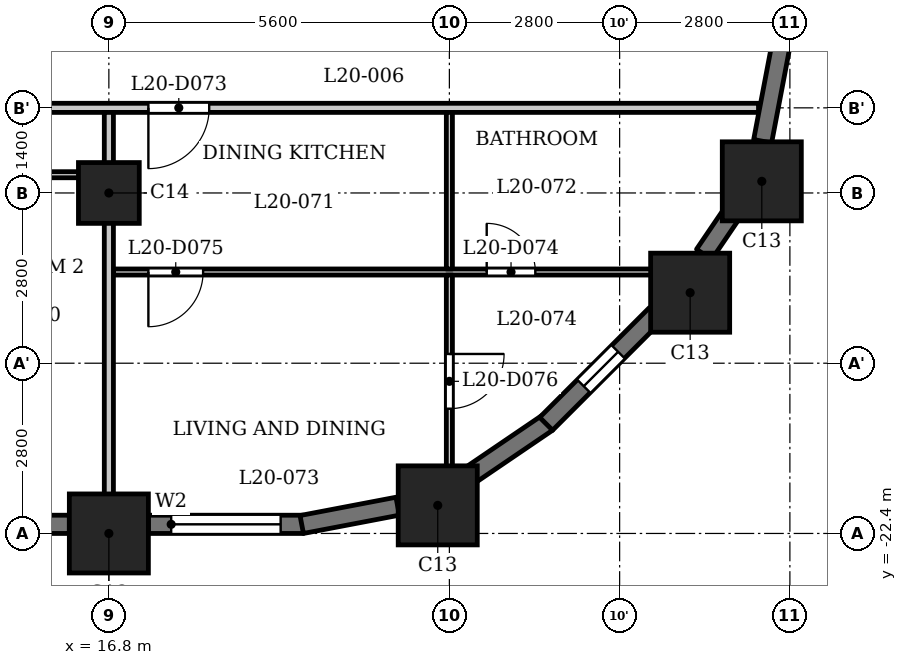
"""IFC4 building model, lengths in metres.
Left out: names, types, materials, properties, quantities, classifications, styles, units other than length and angle.
Written with IfcOpenShell. Run it as: python <this file> out.ifc"""

import sys

from ifc_helpers import new_model, si_unit, direction, frame, frame_2d, origin, origin_2d, place, context, subcontext, project, spatial, rectangle, extrude, element, fill, save


model = new_model("IFC4")
c1 = context("Model", 3, precision=1e-05, world=origin(), true_north=direction((0.0, 1.0)))
c2 = subcontext(c1, "Body", "Model", "MODEL_VIEW")
j1 = project(units=[si_unit("LENGTHUNIT", "METRE"), si_unit("PLANEANGLEUNIT", "RADIAN")], contexts=[c1])
p1 = place(None, origin())
s1 = spatial("IfcSite", under=j1, at=p1, CompositionType="ELEMENT")
p2 = place(p1, origin())
s2 = spatial("IfcBuilding", under=s1, at=p2, CompositionType="ELEMENT")
p3 = place(p2, frame((0.0, 0.0, 83.3)))
s3 = spatial("IfcBuildingStorey", under=s2, at=p3, CompositionType="ELEMENT", Elevation=83.3)
for number, where, z_axis, x_axis in (
    (1, (16.8, -22.4, 0.0), (0.0, 0.0, 1.0), (1.0, 0.0, 0.0)),
    (2, (22.209, -21.938, 0.0), (0.0, 0.0, 1.0), (1.0, 0.0, 0.0)),
    (3, (26.36, -18.44, 0.0), (0.0, 0.0, 1.0), (1.0, 0.0, 0.0)),
    (4, (27.538, -16.609, 0.0), (0.0, 0.0, 1.0), (1.0, 0.0, 0.0)),
):
    element("IfcColumn", number, at=place(p3, frame(where, z_axis=z_axis, x_axis=x_axis)), inside=s3, PredefinedType="COLUMN", context=c2, shape_type="SweptSolid", body=[
        extrude(rectangle(XDim=1.3, YDim=1.3, at=origin_2d()), origin(), (0.0, 0.0, 1.0), 3.5),
    ])
p4 = place(p3, frame((16.8, -16.8, 0.0), z_axis=(0.0, 0.0, 1.0), x_axis=(1.0, 0.0, 0.0)))
e5 = element("IfcColumn", 5, at=p4, inside=s3, PredefinedType="COLUMN", context=c2, shape_type="SweptSolid", body=[
    extrude(rectangle(XDim=1.0, YDim=1.0, at=origin_2d()), origin(), (0.0, 0.0, 1.0), 3.5),
])
p5 = place(p3, frame((11.85, -22.25, 0.0), z_axis=(0.0, 0.0, 1.0), x_axis=(1.0, 0.0, 0.0)))
e6 = element("IfcWall", 6, at=p5, inside=s3, PredefinedType="SOLIDWALL", context=c2, shape_type="SweptSolid", body=[
    extrude(rectangle(XDim=4.3, YDim=0.3, at=frame_2d((2.15, 0.0))), origin(), (0.0, 0.0, 1.0), 2.4),
])
p6 = place(p5, frame((0.337, 0.0, 0.6)))
e7 = element("IfcOpeningElement", 7, at=p6, cuts=e6, PredefinedType="OPENING", context=c2, shape_type="SweptSolid", body=[
    extrude(rectangle(XDim=1.2, YDim=1.55, at=frame_2d((0.6, 0.775))), frame((0.0, 0.16, 0.0), z_axis=(0.0, -1.0, 0.0), x_axis=(1.0, 0.0, 0.0)), (0.0, 0.0, 1.0), 0.32),
])
p7 = place(p5, frame((2.562, 0.0, 0.6)))
e8 = element("IfcOpeningElement", 8, at=p7, cuts=e6, PredefinedType="OPENING", context=c2, shape_type="SweptSolid", body=[
    extrude(rectangle(XDim=1.2, YDim=1.55, at=frame_2d((0.6, 0.775))), frame((0.0, 0.16, 0.0), z_axis=(0.0, -1.0, 0.0), x_axis=(1.0, 0.0, 0.0)), (0.0, 0.0, 1.0), 0.32),
])
p8 = place(p3, frame((17.45, -22.25, 0.0), z_axis=(0.0, 0.0, 1.0), x_axis=(1.0, 0.0, 0.0)))
e9 = element("IfcWall", 9, at=p8, inside=s3, PredefinedType="SOLIDWALL", context=c2, shape_type="SweptSolid", body=[
    extrude(rectangle(XDim=2.55, YDim=0.3, at=frame_2d((1.275, 0.0))), origin(), (0.0, 0.0, 1.0), 2.4),
])
p9 = place(p8, frame((0.375, 0.0, 0.9)))
e10 = element("IfcOpeningElement", 10, at=p9, cuts=e9, PredefinedType="OPENING", context=c2, shape_type="SweptSolid", body=[
    extrude(rectangle(XDim=1.8, YDim=1.25, at=frame_2d((0.9, 0.625))), frame((0.0, 0.16, 0.0), z_axis=(0.0, -1.0, 0.0), x_axis=(1.0, 0.0, 0.0)), (0.0, 0.0, 1.0), 0.32),
])
for number, where, z_axis, x_axis in (
    (11, (19.972, -22.253, 0.0), (0.0, 0.0, 1.0), (0.982, 0.187, 0.0)),
    (12, (22.684, -21.482, 0.0), (0.0, 0.0, 1.0), (0.827, 0.562, 0.0)),
):
    element("IfcWall", number, at=place(p3, frame(where, z_axis=z_axis, x_axis=x_axis)), inside=s3, PredefinedType="SOLIDWALL", context=c2, shape_type="SweptSolid", body=[
        extrude(rectangle(XDim=1.606, YDim=0.3, at=frame_2d((0.803, 0.0))), origin(), (0.0, 0.0, 1.0), 2.4),
    ])
p10 = place(p3, frame((23.991, -20.597, 0.0), z_axis=(0.0, 0.0, 1.0), x_axis=(0.707106781187, 0.707106781187, 0.0)))
e13 = element("IfcWall", 13, at=p10, inside=s3, PredefinedType="SOLIDWALL", context=c2, shape_type="SweptSolid", body=[
    extrude(rectangle(XDim=2.55, YDim=0.3, at=frame_2d((1.275, 0.0))), origin(), (0.0, 0.0, 1.0), 2.4),
])
p11 = place(p10, frame((0.875, 0.0, 0.6)))
e14 = element("IfcOpeningElement", 14, at=p11, cuts=e13, PredefinedType="OPENING", context=c2, shape_type="SweptSolid", body=[
    extrude(rectangle(XDim=0.8, YDim=1.55, at=frame_2d((0.4, 0.775))), frame((0.0, 0.16, 0.0), z_axis=(0.0, -1.0, 0.0), x_axis=(1.0, 0.0, 0.0)), (0.0, 0.0, 1.0), 0.32),
])
p12 = place(p3, frame((26.589, -17.81, 0.0), z_axis=(0.0, 0.0, 1.0), x_axis=(0.562066330934, 0.827092159091, 0.0)))
e15 = element("IfcWall", 15, at=p12, inside=s3, PredefinedType="SOLIDWALL", context=c2, shape_type="SweptSolid", body=[
    extrude(rectangle(XDim=0.877, YDim=0.3, at=frame_2d((0.438, 0.0))), origin(), (0.0, 0.0, 1.0), 3.2),
])
p13 = place(p3, frame((27.552, -15.949, 0.0), z_axis=(0.0, 0.0, 1.0), x_axis=(0.187279751651, 0.982306619453, 0.0)))
e16 = element("IfcWall", 16, at=p13, inside=s3, PredefinedType="SOLIDWALL", context=c2, shape_type="SweptSolid", body=[
    extrude(rectangle(XDim=1.606, YDim=0.3, at=frame_2d((0.803, 0.0))), origin(), (0.0, 0.0, 1.0), 2.4),
])
p14 = place(p3, frame((16.875, -18.1, 0.0), z_axis=(0.0, 0.0, 1.0), x_axis=(1.0, 0.0, 0.0)))
e17 = element("IfcWall", 17, at=p14, inside=s3, PredefinedType="PARTITIONING", context=c2, shape_type="SweptSolid", body=[
    extrude(rectangle(XDim=9.565, YDim=0.1, at=frame_2d((4.782, 0.0))), origin(), (0.0, 0.0, 1.0), 3.2),
])
p15 = place(p14, frame((6.139, 0.0, 0.0)))
e18 = element("IfcOpeningElement", 18, at=p15, cuts=e17, PredefinedType="OPENING", context=c2, shape_type="SweptSolid", body=[
    extrude(rectangle(XDim=0.8, YDim=2.1, at=frame_2d((0.4, 1.05))), frame((0.0, 0.06, 0.0), z_axis=(0.0, -1.0, 0.0), x_axis=(1.0, 0.0, 0.0)), (0.0, 0.0, 1.0), 0.12),
])
p16 = place(p14, frame((0.575, 0.0, 0.0)))
e19 = element("IfcOpeningElement", 19, at=p16, cuts=e17, PredefinedType="OPENING", context=c2, shape_type="SweptSolid", body=[
    extrude(rectangle(XDim=0.9, YDim=2.1, at=frame_2d((0.45, 1.05))), frame((0.0, 0.06, 0.0), z_axis=(0.0, -1.0, 0.0), x_axis=(1.0, 0.0, 0.0)), (0.0, 0.0, 1.0), 0.12),
])
p17 = place(p3, frame((-16.725, -16.5, 0.0), z_axis=(0.0, 0.0, 1.0), x_axis=(1.0, 0.0, 0.0)))
e20 = element("IfcWall", 20, at=p17, inside=s3, PredefinedType="PARTITIONING", context=c2, shape_type="SweptSolid", body=[
    extrude(rectangle(XDim=33.45, YDim=0.1, at=frame_2d((16.725, 0.0))), origin(), (0.0, 0.0, 1.0), 3.2),
])
p18 = place(p17, frame((3.825, 0.0, 0.0)))
e21 = element("IfcOpeningElement", 21, at=p18, cuts=e20, PredefinedType="OPENING", context=c2, shape_type="SweptSolid", body=[
    extrude(rectangle(XDim=0.8, YDim=2.1, at=frame_2d((0.4, 1.05))), frame((0.0, 0.06, 0.0), z_axis=(0.0, -1.0, 0.0), x_axis=(1.0, 0.0, 0.0)), (0.0, 0.0, 1.0), 0.12),
])
p19 = place(p17, frame((1.825, 0.0, 0.0)))
e22 = element("IfcOpeningElement", 22, at=p19, cuts=e20, PredefinedType="OPENING", context=c2, shape_type="SweptSolid", body=[
    extrude(rectangle(XDim=0.9, YDim=2.1, at=frame_2d((0.45, 1.05))), frame((0.0, 0.06, 0.0), z_axis=(0.0, -1.0, 0.0), x_axis=(1.0, 0.0, 0.0)), (0.0, 0.0, 1.0), 0.12),
])
p20 = place(p17, frame((9.675, 0.0, 0.0)))
e23 = element("IfcOpeningElement", 23, at=p20, cuts=e20, PredefinedType="OPENING", context=c2, shape_type="SweptSolid", body=[
    extrude(rectangle(XDim=0.8, YDim=2.1, at=frame_2d((0.4, 1.05))), frame((0.0, 0.06, 0.0), z_axis=(0.0, -1.0, 0.0), x_axis=(1.0, 0.0, 0.0)), (0.0, 0.0, 1.0), 0.12),
])
p21 = place(p17, frame((6.425, 0.0, 0.0)))
e24 = element("IfcOpeningElement", 24, at=p21, cuts=e20, PredefinedType="OPENING", context=c2, shape_type="SweptSolid", body=[
    extrude(rectangle(XDim=0.9, YDim=2.1, at=frame_2d((0.45, 1.05))), frame((0.0, 0.06, 0.0), z_axis=(0.0, -1.0, 0.0), x_axis=(1.0, 0.0, 0.0)), (0.0, 0.0, 1.0), 0.12),
])
p22 = place(p17, frame((15.275, 0.0, 0.0)))
e25 = element("IfcOpeningElement", 25, at=p22, cuts=e20, PredefinedType="OPENING", context=c2, shape_type="SweptSolid", body=[
    extrude(rectangle(XDim=0.8, YDim=2.1, at=frame_2d((0.4, 1.05))), frame((0.0, 0.06, 0.0), z_axis=(0.0, -1.0, 0.0), x_axis=(1.0, 0.0, 0.0)), (0.0, 0.0, 1.0), 0.12),
])
p23 = place(p17, frame((12.025, 0.0, 0.0)))
e26 = element("IfcOpeningElement", 26, at=p23, cuts=e20, PredefinedType="OPENING", context=c2, shape_type="SweptSolid", body=[
    extrude(rectangle(XDim=0.9, YDim=2.1, at=frame_2d((0.45, 1.05))), frame((0.0, 0.06, 0.0), z_axis=(0.0, -1.0, 0.0), x_axis=(1.0, 0.0, 0.0)), (0.0, 0.0, 1.0), 0.12),
])
p24 = place(p17, frame((20.875, 0.0, 0.0)))
e27 = element("IfcOpeningElement", 27, at=p24, cuts=e20, PredefinedType="OPENING", context=c2, shape_type="SweptSolid", body=[
    extrude(rectangle(XDim=0.8, YDim=2.1, at=frame_2d((0.4, 1.05))), frame((0.0, 0.06, 0.0), z_axis=(0.0, -1.0, 0.0), x_axis=(1.0, 0.0, 0.0)), (0.0, 0.0, 1.0), 0.12),
])
p25 = place(p17, frame((18.625, 0.0, 0.0)))
e28 = element("IfcOpeningElement", 28, at=p25, cuts=e20, PredefinedType="OPENING", context=c2, shape_type="SweptSolid", body=[
    extrude(rectangle(XDim=0.9, YDim=2.1, at=frame_2d((0.45, 1.05))), frame((0.0, 0.06, 0.0), z_axis=(0.0, -1.0, 0.0), x_axis=(1.0, 0.0, 0.0)), (0.0, 0.0, 1.0), 0.12),
])
p26 = place(p17, frame((23.875, 0.0, 0.0)))
e29 = element("IfcOpeningElement", 29, at=p26, cuts=e20, PredefinedType="OPENING", context=c2, shape_type="SweptSolid", body=[
    extrude(rectangle(XDim=0.8, YDim=2.1, at=frame_2d((0.4, 1.05))), frame((0.0, 0.06, 0.0), z_axis=(0.0, -1.0, 0.0), x_axis=(1.0, 0.0, 0.0)), (0.0, 0.0, 1.0), 0.12),
])
p27 = place(p17, frame((26.225, 0.0, 0.0)))
e30 = element("IfcOpeningElement", 30, at=p27, cuts=e20, PredefinedType="OPENING", context=c2, shape_type="SweptSolid", body=[
    extrude(rectangle(XDim=0.9, YDim=2.1, at=frame_2d((0.45, 1.05))), frame((0.0, 0.06, 0.0), z_axis=(0.0, -1.0, 0.0), x_axis=(1.0, 0.0, 0.0)), (0.0, 0.0, 1.0), 0.12),
])
p28 = place(p17, frame((28.575, 0.0, 0.0)))
e31 = element("IfcOpeningElement", 31, at=p28, cuts=e20, PredefinedType="OPENING", context=c2, shape_type="SweptSolid", body=[
    extrude(rectangle(XDim=0.9, YDim=2.1, at=frame_2d((0.45, 1.05))), frame((0.0, 0.06, 0.0), z_axis=(0.0, -1.0, 0.0), x_axis=(1.0, 0.0, 0.0)), (0.0, 0.0, 1.0), 0.12),
])
p29 = place(p17, frame((30.675, 0.0, 0.0)))
e32 = element("IfcOpeningElement", 32, at=p29, cuts=e20, PredefinedType="OPENING", context=c2, shape_type="SweptSolid", body=[
    extrude(rectangle(XDim=0.9, YDim=2.1, at=frame_2d((0.45, 1.05))), frame((0.0, 0.06, 0.0), z_axis=(0.0, -1.0, 0.0), x_axis=(1.0, 0.0, 0.0)), (0.0, 0.0, 1.0), 0.12),
])
p30 = place(p3, frame((14.925, -15.4, 0.0), z_axis=(0.0, 0.0, 1.0), x_axis=(1.0, 0.0, 0.0)))
e33 = element("IfcWall", 33, at=p30, inside=s3, PredefinedType="PARTITIONING", context=c2, shape_type="SweptSolid", body=[
    extrude(rectangle(XDim=12.559, YDim=0.15, at=frame_2d((6.279, 0.0))), origin(), (0.0, 0.0, 1.0), 3.2),
])
p31 = place(p30, frame((2.525, 0.0, 0.0)))
e34 = element("IfcOpeningElement", 34, at=p31, cuts=e33, PredefinedType="OPENING", context=c2, shape_type="SweptSolid", body=[
    extrude(rectangle(XDim=1.0, YDim=2.1, at=frame_2d((0.5, 1.05))), frame((0.0, 0.085, 0.0), z_axis=(0.0, -1.0, 0.0), x_axis=(1.0, 0.0, 0.0)), (0.0, 0.0, 1.0), 0.17),
])
p32 = place(p3, frame((16.8, -23.03, 0.0), z_axis=(0.0, 0.0, 1.0), x_axis=(0.0, 1.0, 0.0)))
e35 = element("IfcWall", 35, at=p32, inside=s3, PredefinedType="PARTITIONING", context=c2, shape_type="SweptSolid", body=[
    extrude(rectangle(XDim=7.555, YDim=0.15, at=frame_2d((3.777, 0.0))), origin(), (0.0, 0.0, 1.0), 3.2),
])
p33 = place(p3, frame((22.4, -21.72, 0.0), z_axis=(0.0, 0.0, 1.0), x_axis=(0.0, 1.0, 0.0)))
e36 = element("IfcWall", 36, at=p33, inside=s3, PredefinedType="PARTITIONING", context=c2, shape_type="SweptSolid", body=[
    extrude(rectangle(XDim=3.57, YDim=0.1, at=frame_2d((1.785, 0.0))), origin(), (0.0, 0.0, 1.0), 3.2),
])
p34 = place(p33, frame((1.372, 0.0, 0.0)))
e37 = element("IfcOpeningElement", 37, at=p34, cuts=e36, PredefinedType="OPENING", context=c2, shape_type="SweptSolid", body=[
    extrude(rectangle(XDim=0.9, YDim=2.1, at=frame_2d((0.45, 1.05))), frame((0.0, 0.06, 0.0), z_axis=(0.0, -1.0, 0.0), x_axis=(1.0, 0.0, 0.0)), (0.0, 0.0, 1.0), 0.12),
])
p35 = place(p3, frame((22.4, -18.05, 0.0), z_axis=(0.0, 0.0, 1.0), x_axis=(0.0, 1.0, 0.0)))
e38 = element("IfcWall", 38, at=p35, inside=s3, PredefinedType="PARTITIONING", context=c2, shape_type="SweptSolid", body=[
    extrude(rectangle(XDim=2.575, YDim=0.1, at=frame_2d((1.288, 0.0))), origin(), (0.0, 0.0, 1.0), 3.2),
])
p36 = place(p31, origin())
e39 = element("IfcDoor", 39, at=p36, inside=s3, OperationType="SINGLE_SWING_LEFT", PredefinedType="DOOR", context=c2, shape_type="SweptSolid", body=[
    extrude(rectangle(XDim=1.0, YDim=2.1, at=frame_2d((0.5, 1.05))), frame((0.0, 0.025, 0.0), z_axis=(0.0, -1.0, 0.0), x_axis=(1.0, 0.0, 0.0)), (0.0, 0.0, 1.0), 0.05),
])
fill(e34, e39)
p37 = place(p15, origin())
e40 = element("IfcDoor", 40, at=p37, inside=s3, OperationType="SINGLE_SWING_RIGHT", PredefinedType="DOOR", context=c2, shape_type="SweptSolid", body=[
    extrude(rectangle(XDim=0.8, YDim=2.1, at=frame_2d((0.4, 1.05))), frame((0.0, 0.025, 0.0), z_axis=(0.0, -1.0, 0.0), x_axis=(1.0, 0.0, 0.0)), (0.0, 0.0, 1.0), 0.05),
])
fill(e18, e40)
p38 = place(p16, origin())
e41 = element("IfcDoor", 41, at=p38, inside=s3, OperationType="SINGLE_SWING_LEFT", PredefinedType="DOOR", context=c2, shape_type="SweptSolid", body=[
    extrude(rectangle(XDim=0.9, YDim=2.1, at=frame_2d((0.45, 1.05))), frame((0.0, 0.025, 0.0), z_axis=(0.0, -1.0, 0.0), x_axis=(1.0, 0.0, 0.0)), (0.0, 0.0, 1.0), 0.05),
])
fill(e19, e41)
p39 = place(p34, origin())
e42 = element("IfcDoor", 42, at=p39, inside=s3, OperationType="SINGLE_SWING_RIGHT", PredefinedType="DOOR", context=c2, shape_type="SweptSolid", body=[
    extrude(rectangle(XDim=0.9, YDim=2.1, at=frame_2d((0.45, 1.05))), frame((0.0, 0.025, 0.0), z_axis=(0.0, -1.0, 0.0), x_axis=(1.0, 0.0, 0.0)), (0.0, 0.0, 1.0), 0.05),
])
fill(e37, e42)
p40 = place(p9, origin())
e43 = element("IfcWindow", 43, at=p40, inside=s3, PartitioningType="SINGLE_PANEL", PredefinedType="WINDOW", context=c2, shape_type="SweptSolid", body=[
    extrude(rectangle(XDim=1.8, YDim=1.25, at=frame_2d((0.9, 0.625))), frame((0.0, 0.03, 0.0), z_axis=(0.0, -1.0, 0.0), x_axis=(1.0, 0.0, 0.0)), (0.0, 0.0, 1.0), 0.06),
])
fill(e10, e43)
p41 = place(p11, origin())
e44 = element("IfcWindow", 44, at=p41, inside=s3, PartitioningType="SINGLE_PANEL", PredefinedType="WINDOW", context=c2, shape_type="SweptSolid", body=[
    extrude(rectangle(XDim=0.8, YDim=1.55, at=frame_2d((0.4, 0.775))), frame((0.0, 0.03, 0.0), z_axis=(0.0, -1.0, 0.0), x_axis=(1.0, 0.0, 0.0)), (0.0, 0.0, 1.0), 0.06),
])
fill(e14, e44)
save(model, sys.argv[1])
